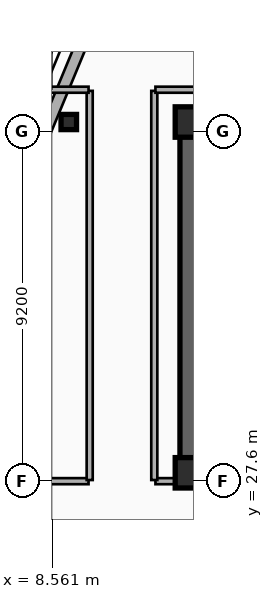
"""IFC4 building model, lengths in metres.
Left out: names, types, materials, properties, quantities, classifications, styles, units other than length and angle.
Written with IfcOpenShell. Run it as: python <this file> out.ifc"""

import sys

from ifc_helpers import new_model, si_unit, direction, frame, frame_2d, origin, origin_2d, place, context, subcontext, project, spatial, rectangle, i_section, extrude, element, save


model = new_model("IFC4")
c1 = context("Model", 3, precision=1e-05, world=origin(), true_north=direction((0.0, 1.0)))
c2 = subcontext(c1, "Body", "Model", "MODEL_VIEW")
j1 = project(units=[si_unit("LENGTHUNIT", "METRE"), si_unit("PLANEANGLEUNIT", "RADIAN")], contexts=[c1])
p1 = place(None, origin())
s1 = spatial("IfcSite", under=j1, at=p1, CompositionType="ELEMENT")
p2 = place(p1, origin())
s2 = spatial("IfcBuilding", under=s1, at=p2, CompositionType="ELEMENT")
p3 = place(p2, frame((0.0, 0.0, 269.5)))
s3 = spatial("IfcBuildingStorey", under=s2, at=p3, CompositionType="ELEMENT", Elevation=269.5)
p4 = place(p3, frame((12.15, 37.05, 0.0), z_axis=(0.0, 0.0, 1.0), x_axis=(1.0, 0.0, 0.0)))
e1 = element("IfcWall", 1, at=p4, inside=s3, PredefinedType="SHEAR", context=c2, shape_type="SweptSolid", body=[
    extrude(rectangle(XDim=33.23, YDim=0.45, at=frame_2d((16.615, 0.0))), origin(), (0.0, 0.0, 1.0), 3.7),
])
p5 = place(p3, frame((21.18, 27.82, 0.0), z_axis=(0.0, 0.0, 1.0), x_axis=(-1.0, 0.0, 0.0)))
e2 = element("IfcWall", 2, at=p5, inside=s3, PredefinedType="SHEAR", context=c2, shape_type="SweptSolid", body=[
    extrude(rectangle(XDim=9.03, YDim=0.45, at=frame_2d((4.515, 0.0))), origin(), (0.0, 0.0, 1.0), 3.7),
])
p6 = place(p5, frame((2.68, 0.0, 0.0)))
e3 = element("IfcOpeningElement", 3, at=p6, cuts=e2, PredefinedType="OPENING", context=c2, shape_type="SweptSolid", body=[
    extrude(rectangle(XDim=1.1, YDim=2.15, at=frame_2d((0.55, 1.075))), frame((0.0, 0.235, 0.0), z_axis=(0.0, -1.0, 0.0), x_axis=(1.0, 0.0, 0.0)), (0.0, 0.0, 1.0), 0.47),
])
p7 = place(p3, frame((12.15, 28.045, 0.0), z_axis=(0.0, 0.0, 1.0), x_axis=(0.0, 1.0, 0.0)))
e4 = element("IfcWall", 4, at=p7, inside=s3, PredefinedType="SHEAR", context=c2, shape_type="SweptSolid", body=[
    extrude(rectangle(XDim=8.78, YDim=0.45, at=frame_2d((4.39, 0.0))), origin(), (0.0, 0.0, 1.0), 3.7),
])
for number, where, z_axis, x_axis in (
    (5, (12.2, 27.82, 0.0), (0.0, 0.0, 1.0), (1.0, 0.0, 0.0)),
    (6, (12.2, 37.05, 0.0), (0.0, 0.0, 1.0), (1.0, 0.0, 0.0)),
):
    element("IfcColumn", number, at=place(p3, frame(where, z_axis=z_axis, x_axis=x_axis)), inside=s3, PredefinedType="COLUMN", context=c2, shape_type="SweptSolid", body=[
        extrude(rectangle(XDim=0.8, YDim=0.8, at=origin_2d()), origin(), (0.0, 0.0, 1.0), 3.7),
    ])
p8 = place(p3, frame((9.0, 37.05, 0.0), z_axis=(0.0, 0.0, 1.0), x_axis=(1.0, 0.0, 0.0)))
e7 = element("IfcColumn", 7, at=p8, inside=s3, PredefinedType="COLUMN", context=c2, shape_type="SweptSolid", body=[
    extrude(i_section(OverallWidth=0.408, OverallDepth=0.4, WebThickness=0.025, FlangeThickness=0.039, FilletRadius=0.015, at=origin_2d()), origin(), (0.0, 0.0, 1.0), 3.7),
])
p9 = place(p3, frame((8.38, 36.8, 0.0), z_axis=(0.0, 0.0, 1.0), x_axis=(0.382704529509, 0.923870793506, 0.0)))
e8 = element("IfcWall", 8, at=p9, inside=s3, PredefinedType="SOLIDWALL", context=c2, shape_type="SweptSolid", body=[
    extrude(rectangle(XDim=3.077, YDim=0.3, at=frame_2d((1.538, 0.0))), origin(), (0.0, 0.0, 1.0), 3.42),
])
p10 = place(p3, frame((8.49, 27.6, 0.0), z_axis=(0.0, 0.0, 1.0), x_axis=(1.0, 0.0, 0.0)))
e9 = element("IfcWall", 9, at=p10, inside=s3, PredefinedType="PARTITIONING", context=c2, shape_type="SweptSolid", body=[
    extrude(rectangle(XDim=1.03, YDim=0.16, at=frame_2d((0.515, 0.0))), origin(), (0.0, 0.0, 1.0), 3.42),
])
p11 = place(p3, frame((11.28, 27.6, 0.0), z_axis=(0.0, 0.0, 1.0), x_axis=(1.0, 0.0, 0.0)))
e10 = element("IfcWall", 10, at=p11, inside=s3, PredefinedType="PARTITIONING", context=c2, shape_type="SweptSolid", body=[
    extrude(rectangle(XDim=0.84, YDim=0.16, at=frame_2d((0.42, 0.0))), origin(), (0.0, 0.0, 1.0), 2.49),
])
for number, where, z_axis, x_axis in (
    (11, (9.55, 27.63, 0.0), (0.0, 0.0, 1.0), (0.0, 1.0, 0.0)),
    (12, (11.25, 27.63, 0.0), (0.0, 0.0, 1.0), (0.0, 1.0, 0.0)),
):
    element("IfcWall", number, at=place(p3, frame(where, z_axis=z_axis, x_axis=x_axis)), inside=s3, PredefinedType="PARTITIONING", context=c2, shape_type="SweptSolid", body=[
        extrude(rectangle(XDim=10.24, YDim=0.16, at=frame_2d((5.12, 0.0))), origin(), (0.0, 0.0, 1.0), 2.9),
    ])
p12 = place(p3, frame((8.49, 37.9, 0.0), z_axis=(0.0, 0.0, 1.0), x_axis=(1.0, 0.0, 0.0)))
e13 = element("IfcWall", 13, at=p12, inside=s3, PredefinedType="PARTITIONING", context=c2, shape_type="SweptSolid", body=[
    extrude(rectangle(XDim=1.03, YDim=0.16, at=frame_2d((0.515, 0.0))), origin(), (0.0, 0.0, 1.0), 3.42),
])
p13 = place(p3, frame((11.28, 37.9, 0.0), z_axis=(0.0, 0.0, 1.0), x_axis=(1.0, 0.0, 0.0)))
e14 = element("IfcWall", 14, at=p13, inside=s3, PredefinedType="PARTITIONING", context=c2, shape_type="SweptSolid", body=[
    extrude(rectangle(XDim=35.04, YDim=0.16, at=frame_2d((17.52, 0.0))), origin(), (0.0, 0.0, 1.0), 3.42),
])
save(model, sys.argv[1])
